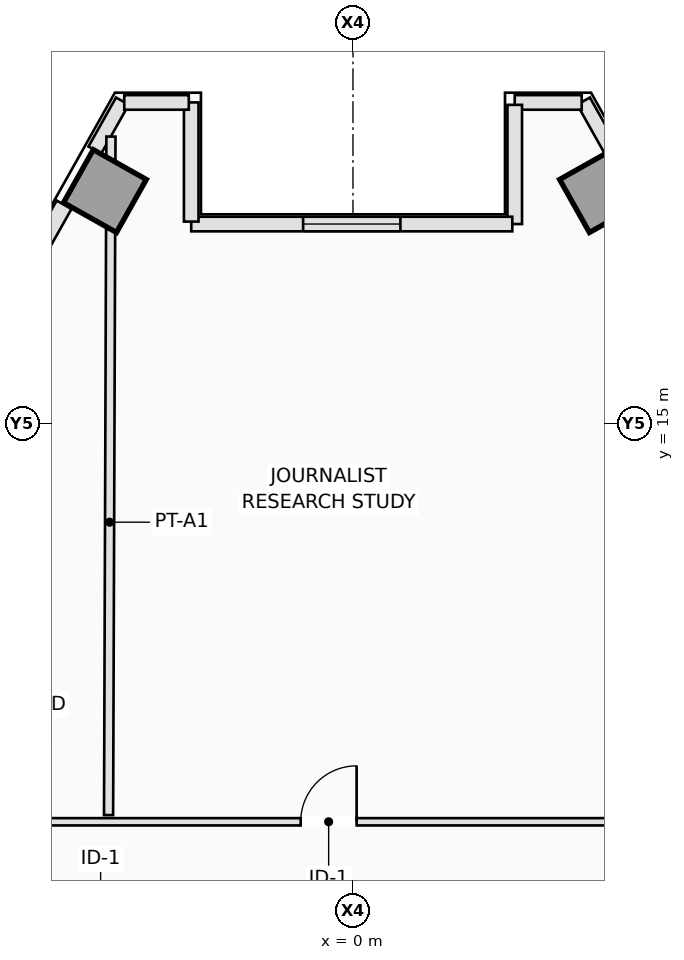
"""IFC4 building model, lengths in metres.
Left out: names, types, materials, properties, quantities, classifications, styles, units other than length and angle.
Written with IfcOpenShell. Run it as: python <this file> out.ifc"""

import sys

from ifc_helpers import new_model, si_unit, direction, frame, frame_2d, origin, origin_2d, place, context, subcontext, project, spatial, rectangle, extrude, element, fill, save


model = new_model("IFC4")
c1 = context("Model", 3, precision=1e-05, world=origin(), true_north=direction((0.0, 1.0)))
c2 = subcontext(c1, "Body", "Model", "MODEL_VIEW")
j1 = project(units=[si_unit("LENGTHUNIT", "METRE"), si_unit("PLANEANGLEUNIT", "RADIAN")], contexts=[c1])
p1 = place(None, origin())
s1 = spatial("IfcSite", under=j1, at=p1, CompositionType="ELEMENT")
p2 = place(p1, origin())
s2 = spatial("IfcBuilding", under=s1, at=p2, CompositionType="ELEMENT")
p3 = place(p2, frame((0.0, 0.0, 168.5)))
s3 = spatial("IfcBuildingStorey", under=s2, at=p3, CompositionType="ELEMENT", Elevation=168.5)
for number, where, z_axis, x_axis in (
    (1, (4.079, 18.822, 0.0), (0.0, 0.0, 1.0), (0.872, 0.49, 0.0)),
    (2, (-4.079, 18.822, 0.0), (0.0, 0.0, 1.0), (-0.872, 0.49, 0.0)),
):
    element("IfcColumn", number, at=place(p3, frame(where, z_axis=z_axis, x_axis=x_axis)), inside=s3, PredefinedType="COLUMN", context=c2, shape_type="SweptSolid", body=[
        extrude(rectangle(XDim=1.0, YDim=1.0, at=origin_2d()), origin(), (0.0, 0.0, 1.0), 3.5),
    ])
for number, where, z_axis, x_axis in (
    (3, (3.792, 20.302, 0.0), (0.0, 0.0, 1.0), (0.49, -0.872, 0.0)),
    (4, (-4.246, 19.495, 0.0), (0.0, 0.0, 1.0), (0.49, 0.872, 0.0)),
):
    element("IfcWall", number, at=place(p3, frame(where, z_axis=z_axis, x_axis=x_axis)), inside=s3, PredefinedType="STANDARD", context=c2, shape_type="SweptSolid", body=[
        extrude(rectangle(XDim=0.926, YDim=0.24, at=frame_2d((0.463, 0.0))), origin(), (0.0, 0.0, 1.0), 3.25),
    ])
p4 = place(p3, frame((-5.661, 16.98, 0.0), z_axis=(0.0, 0.0, 1.0), x_axis=(0.490248749158, 0.871582562899, 0.0)))
e5 = element("IfcWall", 5, at=p4, inside=s3, PredefinedType="STANDARD", context=c2, shape_type="SweptSolid", body=[
    extrude(rectangle(XDim=1.856, YDim=0.28, at=frame_2d((0.928, 0.0))), origin(), (0.0, 0.0, 1.0), 3.25),
])
p5 = place(p3, frame((3.761, 20.28, 0.0), z_axis=(0.0, 0.0, 1.0), x_axis=(-1.0, 0.0, 0.0)))
e6 = element("IfcWall", 6, at=p5, inside=s3, PredefinedType="STANDARD", context=c2, shape_type="SweptSolid", body=[
    extrude(rectangle(XDim=1.102, YDim=0.24, at=frame_2d((0.551, 0.0))), origin(), (0.0, 0.0, 1.0), 3.25),
])
p6 = place(p3, frame((2.66, 20.24, 0.0), z_axis=(0.0, 0.0, 1.0), x_axis=(0.0, -1.0, 0.0)))
e7 = element("IfcWall", 7, at=p6, inside=s3, PredefinedType="STANDARD", context=c2, shape_type="SweptSolid", body=[
    extrude(rectangle(XDim=1.96, YDim=0.24, at=frame_2d((0.98, 0.0))), origin(), (0.0, 0.0, 1.0), 3.25),
])
p7 = place(p3, frame((2.62, 18.28, 0.0), z_axis=(0.0, 0.0, 1.0), x_axis=(-1.0, 0.0, 0.0)))
e8 = element("IfcWall", 8, at=p7, inside=s3, PredefinedType="STANDARD", context=c2, shape_type="SweptSolid", body=[
    extrude(rectangle(XDim=5.28, YDim=0.24, at=frame_2d((2.64, 0.0))), origin(), (0.0, 0.0, 1.0), 3.25),
])
p8 = place(p7, frame((1.84, 0.0, 0.9)))
e9 = element("IfcOpeningElement", 9, at=p8, cuts=e8, PredefinedType="OPENING", context=c2, shape_type="SweptSolid", body=[
    extrude(rectangle(XDim=1.6, YDim=2.1, at=frame_2d((0.8, 1.05))), frame((0.0, 0.13, 0.0), z_axis=(0.0, -1.0, 0.0), x_axis=(1.0, 0.0, 0.0)), (0.0, 0.0, 1.0), 0.26),
])
p9 = place(p3, frame((-2.66, 18.32, 0.0), z_axis=(0.0, 0.0, 1.0), x_axis=(0.0, 1.0, 0.0)))
e10 = element("IfcWall", 10, at=p9, inside=s3, PredefinedType="STANDARD", context=c2, shape_type="SweptSolid", body=[
    extrude(rectangle(XDim=1.96, YDim=0.24, at=frame_2d((0.98, 0.0))), origin(), (0.0, 0.0, 1.0), 3.25),
])
p10 = place(p3, frame((-2.7, 20.28, 0.0), z_axis=(0.0, 0.0, 1.0), x_axis=(-1.0, 0.0, 0.0)))
e11 = element("IfcWall", 11, at=p10, inside=s3, PredefinedType="STANDARD", context=c2, shape_type="SweptSolid", body=[
    extrude(rectangle(XDim=1.062, YDim=0.24, at=frame_2d((0.531, 0.0))), origin(), (0.0, 0.0, 1.0), 3.25),
])
p11 = place(p3, frame((-7.188, 8.45, 0.0), z_axis=(0.0, 0.0, 1.0), x_axis=(1.0, 0.0, 0.0)))
e12 = element("IfcWall", 12, at=p11, inside=s3, PredefinedType="PARTITIONING", context=c2, shape_type="SweptSolid", body=[
    extrude(rectangle(XDim=14.438, YDim=0.12, at=frame_2d((7.219, 0.0))), origin(), (0.0, 0.0, 1.0), 3.25),
])
p12 = place(p11, frame((6.328, 0.0, 0.0)))
e13 = element("IfcOpeningElement", 13, at=p12, cuts=e12, PredefinedType="OPENING", context=c2, shape_type="SweptSolid", body=[
    extrude(rectangle(XDim=0.92, YDim=2.12, at=frame_2d((0.46, 1.06))), frame((0.0, 0.07, 0.0), z_axis=(0.0, -1.0, 0.0), x_axis=(1.0, 0.0, 0.0)), (0.0, 0.0, 1.0), 0.14),
])
p13 = place(p11, frame((12.284, 0.0, 0.0)))
e14 = element("IfcOpeningElement", 14, at=p13, cuts=e12, PredefinedType="OPENING", context=c2, shape_type="SweptSolid", body=[
    extrude(rectangle(XDim=0.92, YDim=2.12, at=frame_2d((0.46, 1.06))), frame((0.0, 0.07, 0.0), z_axis=(0.0, -1.0, 0.0), x_axis=(1.0, 0.0, 0.0)), (0.0, 0.0, 1.0), 0.14),
])
p14 = place(p3, frame((-4.019, 8.56, 0.0), z_axis=(0.0, 0.0, 1.0), x_axis=(0.003497279608, 0.999993884499, 0.0)))
e15 = element("IfcWall", 15, at=p14, inside=s3, PredefinedType="PARTITIONING", context=c2, shape_type="SweptSolid", body=[
    extrude(rectangle(XDim=9.634, YDim=0.15, at=frame_2d((4.817, 0.0))), origin(), (0.0, 0.0, 1.0), 2.717),
])
p15 = place(p3, frame((-3.982, 19.343, 0.0), z_axis=(0.0, 0.0, 1.0), x_axis=(0.003906220198, 0.999992370693, 0.0)))
e16 = element("IfcWall", 16, at=p15, inside=s3, PredefinedType="PARTITIONING", context=c2, shape_type="SweptSolid", body=[
    extrude(rectangle(XDim=0.375, YDim=0.15, at=frame_2d((0.188, 0.0))), origin(), (0.0, 0.0, 1.0), 3.25),
])
p16 = place(p8, origin())
e17 = element("IfcWindow", 17, at=p16, inside=s3, PartitioningType="SINGLE_PANEL", PredefinedType="WINDOW", context=c2, shape_type="SweptSolid", body=[
    extrude(rectangle(XDim=1.6, YDim=2.1, at=frame_2d((0.8, 1.05))), frame((0.0, 0.03, 0.0), z_axis=(0.0, -1.0, 0.0), x_axis=(1.0, 0.0, 0.0)), (0.0, 0.0, 1.0), 0.06),
])
fill(e9, e17)
p17 = place(p12, origin())
e18 = element("IfcDoor", 18, at=p17, inside=s3, OperationType="SINGLE_SWING_RIGHT", PredefinedType="DOOR", context=c2, shape_type="SweptSolid", body=[
    extrude(rectangle(XDim=0.92, YDim=2.12, at=frame_2d((0.46, 1.06))), frame((0.0, 0.025, 0.0), z_axis=(0.0, -1.0, 0.0), x_axis=(1.0, 0.0, 0.0)), (0.0, 0.0, 1.0), 0.05),
])
fill(e13, e18)
save(model, sys.argv[1])
